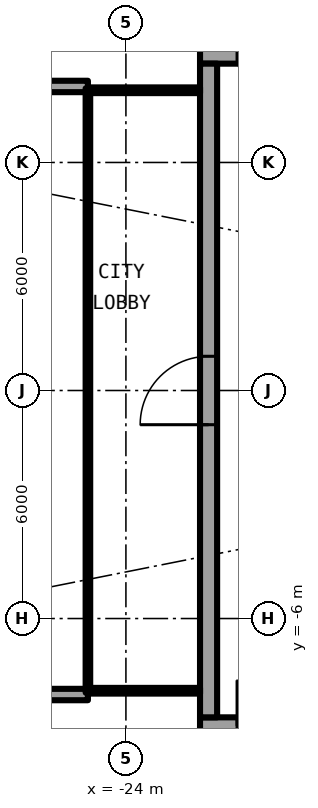
"""IFC4 building model, lengths in metres.
Left out: names, types, materials, properties, quantities, classifications, styles, units other than length and angle.
Written with IfcOpenShell. Run it as: python <this file> out.ifc"""

import sys

from ifc_helpers import new_model, si_unit, direction, frame, frame_2d, origin, place, context, subcontext, project, spatial, rectangle, extrude, element, fill, save


model = new_model("IFC4")
c1 = context("Model", 3, precision=1e-05, world=origin(), true_north=direction((0.0, 1.0)))
c2 = subcontext(c1, "Body", "Model", "MODEL_VIEW")
j1 = project(units=[si_unit("LENGTHUNIT", "METRE"), si_unit("PLANEANGLEUNIT", "RADIAN")], contexts=[c1])
p1 = place(None, origin())
s1 = spatial("IfcSite", under=j1, at=p1, CompositionType="ELEMENT")
p2 = place(p1, origin())
s2 = spatial("IfcBuilding", under=s1, at=p2, CompositionType="ELEMENT")
p3 = place(p2, frame((0.0, 0.0, 202.4)))
s3 = spatial("IfcBuildingStorey", under=s2, at=p3, CompositionType="ELEMENT", Elevation=202.4)
for number, where, z_axis, x_axis in (
    (1, (-25.0, 8.0, 0.0), (0.0, 0.0, 1.0), (-1.0, 0.0, 0.0)),
    (2, (-25.0, -8.0, 0.0), (0.0, 0.0, 1.0), (-1.0, 0.0, 0.0)),
):
    element("IfcWall", number, at=place(p3, frame(where, z_axis=z_axis, x_axis=x_axis)), inside=s3, PredefinedType="SOLIDWALL", context=c2, shape_type="SweptSolid", body=[
        extrude(rectangle(XDim=2.667, YDim=0.3, at=frame_2d((1.333, 0.0))), origin(), (0.0, 0.0, 1.0), 2.7),
    ])
p4 = place(p3, frame((-22.05, -8.825, 0.0), z_axis=(0.0, 0.0, 1.0), x_axis=(1.0, 0.0, 0.0)))
e3 = element("IfcWall", 3, at=p4, inside=s3, PredefinedType="SHEAR", context=c2, shape_type="SweptSolid", body=[
    extrude(rectangle(XDim=13.5, YDim=0.45, at=frame_2d((6.75, 0.0))), origin(), (0.0, 0.0, 1.0), 3.05),
])
p5 = place(p4, frame((0.975, 0.0, 0.0)))
e4 = element("IfcOpeningElement", 4, at=p5, cuts=e3, PredefinedType="OPENING", context=c2, shape_type="SweptSolid", body=[
    extrude(rectangle(XDim=1.2, YDim=2.3, at=frame_2d((0.6, 1.15))), frame((0.0, 0.235, 0.0), z_axis=(0.0, -1.0, 0.0), x_axis=(1.0, 0.0, 0.0)), (0.0, 0.0, 1.0), 0.47),
])
p6 = place(p3, frame((-8.55, 8.825, 0.0), z_axis=(0.0, 0.0, 1.0), x_axis=(-1.0, 0.0, 0.0)))
e5 = element("IfcWall", 5, at=p6, inside=s3, PredefinedType="SHEAR", context=c2, shape_type="SweptSolid", body=[
    extrude(rectangle(XDim=13.5, YDim=0.45, at=frame_2d((6.75, 0.0))), origin(), (0.0, 0.0, 1.0), 3.05),
])
p7 = place(p6, frame((11.325, 0.0, 0.0)))
e6 = element("IfcOpeningElement", 6, at=p7, cuts=e5, PredefinedType="OPENING", context=c2, shape_type="SweptSolid", body=[
    extrude(rectangle(XDim=1.2, YDim=2.3, at=frame_2d((0.6, 1.15))), frame((0.0, 0.235, 0.0), z_axis=(0.0, -1.0, 0.0), x_axis=(1.0, 0.0, 0.0)), (0.0, 0.0, 1.0), 0.47),
])
p8 = place(p3, frame((-21.825, -8.6, 0.0), z_axis=(0.0, 0.0, 1.0), x_axis=(0.0, 1.0, 0.0)))
e7 = element("IfcWall", 7, at=p8, inside=s3, PredefinedType="SHEAR", context=c2, shape_type="SweptSolid", body=[
    extrude(rectangle(XDim=17.2, YDim=0.45, at=frame_2d((8.6, 0.0))), origin(), (0.0, 0.0, 1.0), 3.05),
])
p9 = place(p8, frame((7.7, 0.0, 0.0)))
e8 = element("IfcOpeningElement", 8, at=p9, cuts=e7, PredefinedType="OPENING", context=c2, shape_type="SweptSolid", body=[
    extrude(rectangle(XDim=1.8, YDim=2.3, at=frame_2d((0.9, 1.15))), frame((0.0, 0.235, 0.0), z_axis=(0.0, -1.0, 0.0), x_axis=(1.0, 0.0, 0.0)), (0.0, 0.0, 1.0), 0.47),
])
for number, where, z_axis, x_axis in (
    (9, (-22.05, 7.9, 0.0), (0.0, 0.0, 1.0), (-1.0, 0.0, 0.0)),
    (10, (-22.05, -7.9, 0.0), (0.0, 0.0, 1.0), (-1.0, 0.0, 0.0)),
):
    element("IfcWall", number, at=place(p3, frame(where, z_axis=z_axis, x_axis=x_axis)), inside=s3, PredefinedType="PARTITIONING", context=c2, shape_type="SweptSolid", body=[
        extrude(rectangle(XDim=2.89, YDim=0.15, at=frame_2d((1.445, 0.0))), origin(), (0.0, 0.0, 1.0), 2.7),
    ])
p10 = place(p3, frame((-25.0, 7.95, 0.0), z_axis=(0.0, 0.0, 1.0), x_axis=(0.0, -1.0, 0.0)))
e11 = element("IfcWall", 11, at=p10, inside=s3, PredefinedType="PARTITIONING", context=c2, shape_type="SweptSolid", body=[
    extrude(rectangle(XDim=15.9, YDim=0.12, at=frame_2d((7.95, 0.0))), origin(), (0.0, 0.0, 1.0), 2.7),
])
p11 = place(p10, frame((0.95, 0.0, 0.1)))
e12 = element("IfcOpeningElement", 12, at=p11, cuts=e11, PredefinedType="OPENING", context=c2, shape_type="SweptSolid", body=[
    extrude(rectangle(XDim=14.0, YDim=2.35, at=frame_2d((7.0, 1.175))), frame((0.0, 0.07, 0.0), z_axis=(0.0, -1.0, 0.0), x_axis=(1.0, 0.0, 0.0)), (0.0, 0.0, 1.0), 0.14),
])
p12 = place(p5, origin())
e13 = element("IfcDoor", 13, at=p12, inside=s3, OperationType="SINGLE_SWING_RIGHT", PredefinedType="DOOR", context=c2, shape_type="SweptSolid", body=[
    extrude(rectangle(XDim=1.2, YDim=2.3, at=frame_2d((0.6, 1.15))), frame((0.0, 0.025, 0.0), z_axis=(0.0, -1.0, 0.0), x_axis=(1.0, 0.0, 0.0)), (0.0, 0.0, 1.0), 0.05),
])
fill(e4, e13)
p13 = place(p7, origin())
e14 = element("IfcDoor", 14, at=p13, inside=s3, OperationType="SINGLE_SWING_LEFT", PredefinedType="DOOR", context=c2, shape_type="SweptSolid", body=[
    extrude(rectangle(XDim=1.2, YDim=2.3, at=frame_2d((0.6, 1.15))), frame((0.0, 0.025, 0.0), z_axis=(0.0, -1.0, 0.0), x_axis=(1.0, 0.0, 0.0)), (0.0, 0.0, 1.0), 0.05),
])
fill(e6, e14)
p14 = place(p9, origin())
e15 = element("IfcDoor", 15, at=p14, inside=s3, OperationType="SINGLE_SWING_LEFT", PredefinedType="DOOR", context=c2, shape_type="SweptSolid", body=[
    extrude(rectangle(XDim=1.8, YDim=2.3, at=frame_2d((0.9, 1.15))), frame((0.0, 0.025, 0.0), z_axis=(0.0, -1.0, 0.0), x_axis=(1.0, 0.0, 0.0)), (0.0, 0.0, 1.0), 0.05),
])
fill(e8, e15)
p15 = place(p11, origin())
e16 = element("IfcWindow", 16, at=p15, inside=s3, PartitioningType="SINGLE_PANEL", PredefinedType="WINDOW", context=c2, shape_type="SweptSolid", body=[
    extrude(rectangle(XDim=14.0, YDim=2.35, at=frame_2d((7.0, 1.175))), frame((0.0, 0.03, 0.0), z_axis=(0.0, -1.0, 0.0), x_axis=(1.0, 0.0, 0.0)), (0.0, 0.0, 1.0), 0.06),
])
fill(e12, e16)
save(model, sys.argv[1])
